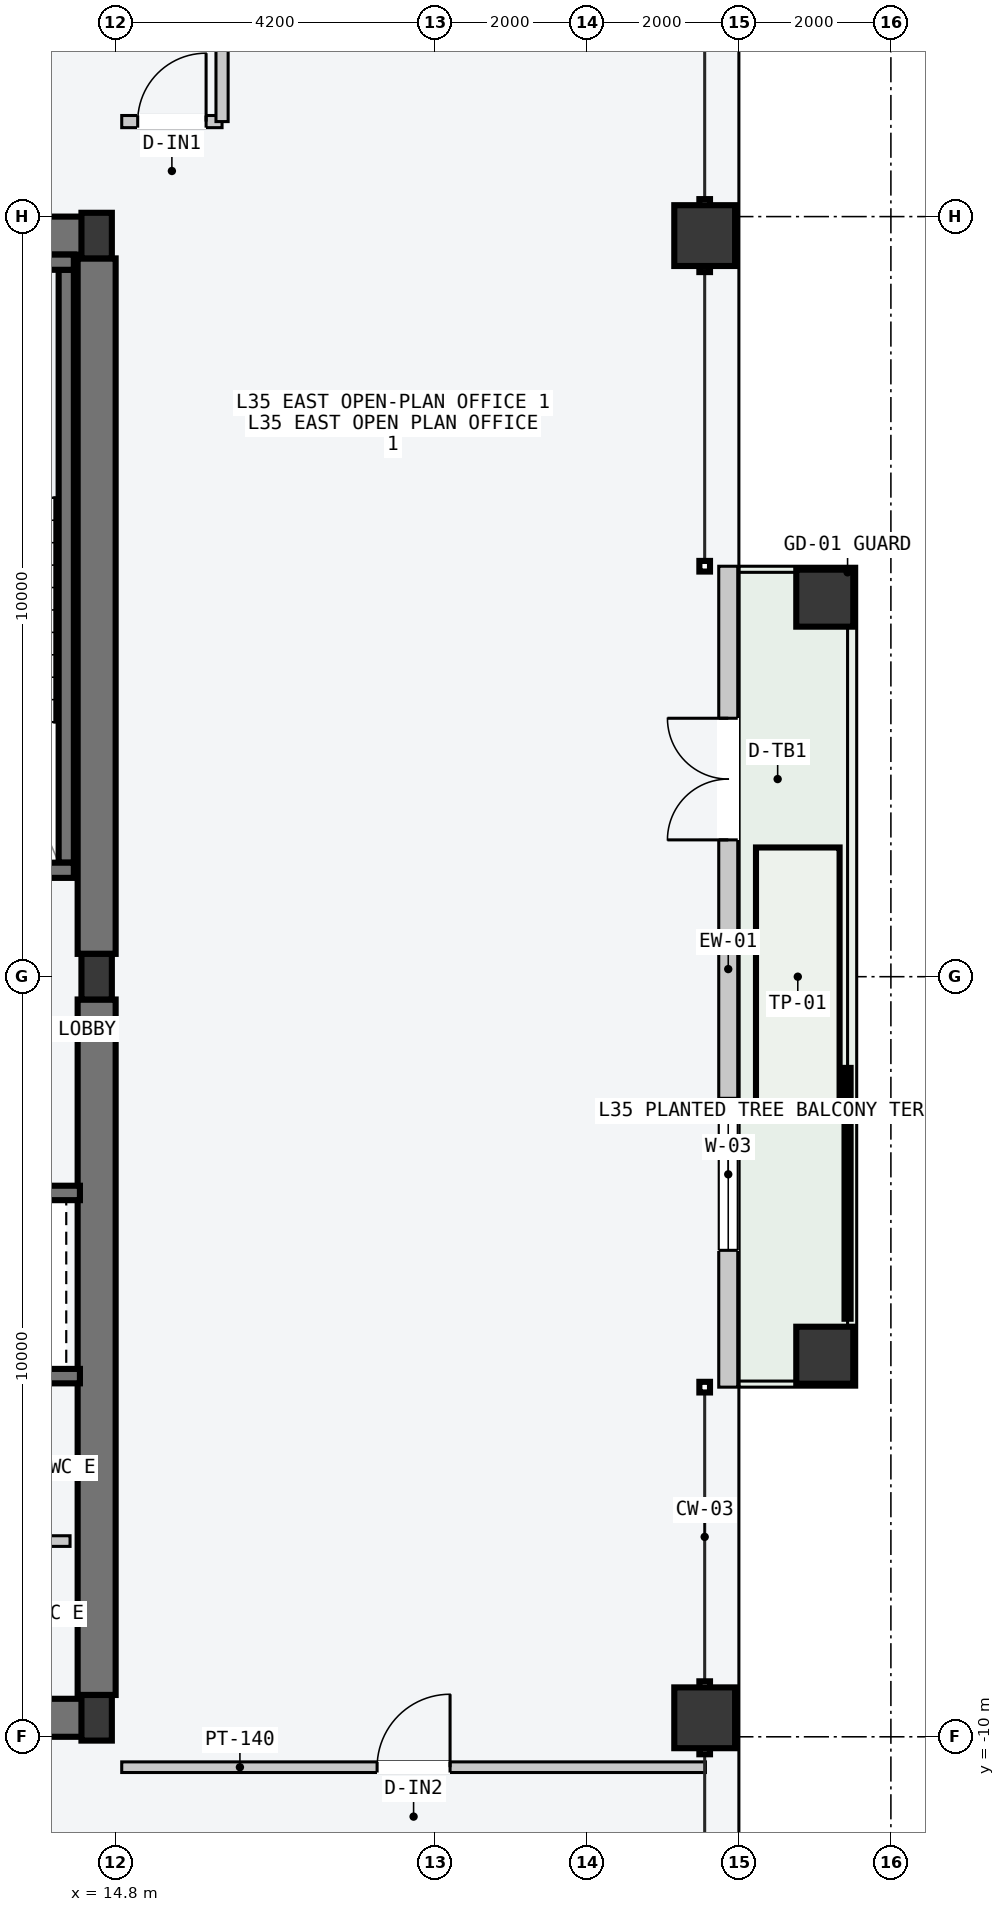
"""IFC4 building model, lengths in metres.
Left out: names, types, materials, properties, quantities, classifications, styles, units other than length and angle.
Written with IfcOpenShell. Run it as: python <this file> out.ifc"""

import sys

from ifc_helpers import new_model, si_unit, direction, frame, frame_2d, origin, origin_2d, place, context, subcontext, project, spatial, rectangle, hollow_rectangle, i_section, extrude, element, fill, save


model = new_model("IFC4")
c1 = context("Model", 3, precision=1e-05, world=origin(), true_north=direction((0.0, 1.0)))
c2 = subcontext(c1, "Body", "Model", "MODEL_VIEW")
j1 = project(units=[si_unit("LENGTHUNIT", "METRE"), si_unit("PLANEANGLEUNIT", "RADIAN")], contexts=[c1])
p1 = place(None, origin())
s1 = spatial("IfcSite", under=j1, at=p1, CompositionType="ELEMENT")
p2 = place(p1, origin())
s2 = spatial("IfcBuilding", under=s1, at=p2, CompositionType="ELEMENT")
p3 = place(p2, frame((0.0, 0.0, 135.0)))
s3 = spatial("IfcBuildingStorey", under=s2, at=p3, CompositionType="ELEMENT", Elevation=135.0)
for number, where, z_axis, x_axis in (
    (1, (8.07, -9.75, -0.2), (0.0, 0.0, 1.0), (1.0, 0.0, 0.0)),
    (2, (8.07, 9.75, -0.2), (0.0, 0.0, 1.0), (1.0, 0.0, 0.0)),
):
    element("IfcWall", number, at=place(p3, frame(where, z_axis=z_axis, x_axis=x_axis)), inside=s3, PredefinedType="SHEAR", context=c2, shape_type="SweptSolid", body=[
        extrude(rectangle(XDim=6.46, YDim=0.5, at=frame_2d((3.23, 0.0))), origin(), (0.0, 0.0, 1.0), 3.6),
    ])
for number, where, z_axis, x_axis in (
    (3, (14.55, -9.45, -0.2), (0.0, 0.0, 1.0), (0.0, 1.0, 0.0)),
    (4, (14.55, 0.3, -0.2), (0.0, 0.0, 1.0), (0.0, 1.0, 0.0)),
):
    element("IfcWall", number, at=place(p3, frame(where, z_axis=z_axis, x_axis=x_axis)), inside=s3, PredefinedType="SHEAR", context=c2, shape_type="SweptSolid", body=[
        extrude(rectangle(XDim=9.15, YDim=0.5, at=frame_2d((4.575, 0.0))), origin(), (0.0, 0.0, 1.0), 3.6),
    ])
p4 = place(p3, frame((14.15, 1.5, -0.2), z_axis=(0.0, 0.0, 1.0), x_axis=(0.0, 1.0, 0.0)))
e5 = element("IfcWall", 5, at=p4, inside=s3, PredefinedType="SOLIDWALL", context=c2, shape_type="SweptSolid", body=[
    extrude(rectangle(XDim=7.8, YDim=0.2, at=frame_2d((3.9, 0.0))), origin(), (0.0, 0.0, 1.0), 3.6),
])
p5 = place(p3, frame((10.15, 1.4, -0.2), z_axis=(0.0, 0.0, 1.0), x_axis=(1.0, 0.0, 0.0)))
e6 = element("IfcWall", 6, at=p5, inside=s3, PredefinedType="SOLIDWALL", context=c2, shape_type="SweptSolid", body=[
    extrude(rectangle(XDim=4.1, YDim=0.2, at=frame_2d((2.05, 0.0))), origin(), (0.0, 0.0, 1.0), 3.6),
])
p6 = place(p5, frame((1.5, 0.0, 0.2)))
e7 = element("IfcOpeningElement", 7, at=p6, cuts=e6, PredefinedType="OPENING", context=c2, shape_type="SweptSolid", body=[
    extrude(rectangle(XDim=1.12, YDim=2.18, at=frame_2d((0.56, 1.09))), frame((0.0, 0.11, 0.0), z_axis=(0.0, -1.0, 0.0), x_axis=(1.0, 0.0, 0.0)), (0.0, 0.0, 1.0), 0.22),
])
p7 = place(p3, frame((10.15, 9.4, -0.2), z_axis=(0.0, 0.0, 1.0), x_axis=(1.0, 0.0, 0.0)))
e8 = element("IfcWall", 8, at=p7, inside=s3, PredefinedType="SOLIDWALL", context=c2, shape_type="SweptSolid", body=[
    extrude(rectangle(XDim=4.1, YDim=0.2, at=frame_2d((2.05, 0.0))), origin(), (0.0, 0.0, 1.0), 3.6),
])
for number, where, z_axis, x_axis in (
    (9, (14.55, -9.75, 0.0), (0.0, 0.0, 1.0), (1.0, 0.0, 0.0)),
    (10, (14.55, 0.0, 0.0), (0.0, 0.0, 1.0), (1.0, 0.0, 0.0)),
    (11, (14.55, 9.75, 0.0), (0.0, 0.0, 1.0), (1.0, 0.0, 0.0)),
):
    element("IfcColumn", number, at=place(p3, frame(where, z_axis=z_axis, x_axis=x_axis)), inside=s3, PredefinedType="COLUMN", context=c2, shape_type="SweptSolid", body=[
        extrude(i_section(OverallWidth=0.4, OverallDepth=0.6, WebThickness=0.022, FlangeThickness=0.036, at=origin_2d()), origin(), (0.0, 0.0, 1.0), 3.6),
    ])
for number, where, z_axis, x_axis in (
    (12, (22.55, -9.75, 0.0), (0.0, 0.0, 1.0), (0.0, 1.0, 0.0)),
    (13, (22.55, 9.75, 0.0), (0.0, 0.0, 1.0), (0.0, 1.0, 0.0)),
):
    element("IfcColumn", number, at=place(p3, frame(where, z_axis=z_axis, x_axis=x_axis)), inside=s3, PredefinedType="COLUMN", context=c2, shape_type="SweptSolid", body=[
        extrude(hollow_rectangle(XDim=0.8, YDim=0.8, WallThickness=0.036, at=origin_2d()), origin(), (0.0, 0.0, 1.0), 3.6),
    ])
for number, where, z_axis, x_axis in (
    (14, (24.13, -4.98, 0.0), (0.0, 0.0, 1.0), (0.0, 1.0, 0.0)),
    (15, (24.13, 4.98, 0.0), (0.0, 0.0, 1.0), (0.0, 1.0, 0.0)),
):
    element("IfcColumn", number, at=place(p3, frame(where, z_axis=z_axis, x_axis=x_axis)), inside=s3, PredefinedType="COLUMN", context=c2, shape_type="SweptSolid", body=[
        extrude(hollow_rectangle(XDim=0.75, YDim=0.75, WallThickness=0.032, at=origin_2d()), origin(), (0.0, 0.0, 1.0), 3.6),
    ])
p8 = place(p3, frame((22.86, -5.4, 0.0), z_axis=(0.0, 0.0, 1.0), x_axis=(0.0, 1.0, 0.0)))
e16 = element("IfcWall", 16, at=p8, inside=s3, PredefinedType="STANDARD", context=c2, shape_type="SweptSolid", body=[
    extrude(rectangle(XDim=10.8, YDim=0.25, at=frame_2d((5.4, 0.0))), origin(), (0.0, 0.0, 1.0), 3.4),
])
p9 = place(p8, frame((7.2, 0.0, 0.0)))
e17 = element("IfcOpeningElement", 17, at=p9, cuts=e16, PredefinedType="OPENING", context=c2, shape_type="SweptSolid", body=[
    extrude(rectangle(XDim=1.6, YDim=2.2, at=frame_2d((0.8, 1.1))), frame((0.0, 0.135, 0.0), z_axis=(0.0, -1.0, 0.0), x_axis=(1.0, 0.0, 0.0)), (0.0, 0.0, 1.0), 0.27),
])
p10 = place(p8, frame((1.8, 0.0, 0.85)))
e18 = element("IfcOpeningElement", 18, at=p10, cuts=e16, PredefinedType="OPENING", context=c2, shape_type="SweptSolid", body=[
    extrude(rectangle(XDim=2.0, YDim=2.1, at=frame_2d((1.0, 1.05))), frame((0.0, 0.135, 0.0), z_axis=(0.0, -1.0, 0.0), x_axis=(1.0, 0.0, 0.0)), (0.0, 0.0, 1.0), 0.27),
])
p11 = place(p3, frame((11.65, -2.845, -0.2), z_axis=(0.0, 0.0, 1.0), x_axis=(1.0, 0.0, 0.0)))
e19 = element("IfcWall", 19, at=p11, inside=s3, PredefinedType="SOLIDWALL", context=c2, shape_type="SweptSolid", body=[
    extrude(rectangle(XDim=2.68, YDim=0.19, at=frame_2d((1.34, 0.0))), origin(), (0.0, 0.0, 1.0), 3.6),
])
p12 = place(p11, frame((0.65, 0.0, 0.2)))
e20 = element("IfcOpeningElement", 20, at=p12, cuts=e19, PredefinedType="OPENING", context=c2, shape_type="SweptSolid", body=[
    extrude(rectangle(XDim=1.2, YDim=2.2, at=frame_2d((0.6, 1.1))), frame((0.0, 0.105, 0.0), z_axis=(0.0, -1.0, 0.0), x_axis=(1.0, 0.0, 0.0)), (0.0, 0.0, 1.0), 0.21),
])
p13 = place(p3, frame((11.65, -5.255, -0.2), z_axis=(0.0, 0.0, 1.0), x_axis=(1.0, 0.0, 0.0)))
e21 = element("IfcWall", 21, at=p13, inside=s3, PredefinedType="SOLIDWALL", context=c2, shape_type="SweptSolid", body=[
    extrude(rectangle(XDim=2.68, YDim=0.19, at=frame_2d((1.34, 0.0))), origin(), (0.0, 0.0, 1.0), 3.6),
])
p14 = place(p3, frame((11.7, -7.425, 0.0), z_axis=(0.0, 0.0, 1.0), x_axis=(1.0, 0.0, 0.0)))
e22 = element("IfcWall", 22, at=p14, inside=s3, PredefinedType="PARTITIONING", context=c2, shape_type="SweptSolid", body=[
    extrude(rectangle(XDim=2.5, YDim=0.14, at=frame_2d((1.25, 0.0))), origin(), (0.0, 0.0, 1.0), 3.4),
])
p15 = place(p3, frame((14.88, -10.4, 0.0), z_axis=(0.0, 0.0, 1.0), x_axis=(1.0, 0.0, 0.0)))
e23 = element("IfcWall", 23, at=p15, inside=s3, PredefinedType="PARTITIONING", context=c2, shape_type="SweptSolid", body=[
    extrude(rectangle(XDim=7.68, YDim=0.14, at=frame_2d((3.84, 0.0))), origin(), (0.0, 0.0, 1.0), 3.4),
])
p16 = place(p15, frame((3.36, 0.0, 0.0)))
e24 = element("IfcOpeningElement", 24, at=p16, cuts=e23, PredefinedType="OPENING", context=c2, shape_type="SweptSolid", body=[
    extrude(rectangle(XDim=0.96, YDim=2.18, at=frame_2d((0.48, 1.09))), frame((0.0, 0.08, 0.0), z_axis=(0.0, -1.0, 0.0), x_axis=(1.0, 0.0, 0.0)), (0.0, 0.0, 1.0), 0.16),
])
p17 = place(p3, frame((14.88, 11.25, 0.0), z_axis=(0.0, 0.0, 1.0), x_axis=(1.0, 0.0, 0.0)))
e25 = element("IfcWall", 25, at=p17, inside=s3, PredefinedType="PARTITIONING", context=c2, shape_type="SweptSolid", body=[
    extrude(rectangle(XDim=1.32, YDim=0.16, at=frame_2d((0.66, 0.0))), origin(), (0.0, 0.0, 1.0), 3.4),
])
p18 = place(p17, frame((0.21, 0.0, 0.0)))
e26 = element("IfcOpeningElement", 26, at=p18, cuts=e25, PredefinedType="OPENING", context=c2, shape_type="SweptSolid", body=[
    extrude(rectangle(XDim=0.9, YDim=2.15, at=frame_2d((0.45, 1.075))), frame((0.0, 0.09, 0.0), z_axis=(0.0, -1.0, 0.0), x_axis=(1.0, 0.0, 0.0)), (0.0, 0.0, 1.0), 0.18),
])
p19 = place(p3, frame((16.2, 11.25, 0.0), z_axis=(0.0, 0.0, 1.0), x_axis=(0.0, 1.0, 0.0)))
e27 = element("IfcWall", 27, at=p19, inside=s3, PredefinedType="PARTITIONING", context=c2, shape_type="SweptSolid", body=[
    extrude(rectangle(XDim=1.95, YDim=0.16, at=frame_2d((0.975, 0.0))), origin(), (0.0, 0.0, 1.0), 3.4),
])
p20 = place(p9, origin())
e28 = element("IfcDoor", 28, at=p20, inside=s3, OperationType="DOUBLE_DOOR_SINGLE_SWING", PredefinedType="DOOR", context=c2, shape_type="SweptSolid", body=[
    extrude(rectangle(XDim=1.6, YDim=2.2, at=frame_2d((0.8, 1.1))), frame((0.0, 0.025, 0.0), z_axis=(0.0, -1.0, 0.0), x_axis=(1.0, 0.0, 0.0)), (0.0, 0.0, 1.0), 0.05),
])
fill(e17, e28)
p21 = place(p10, origin())
e29 = element("IfcWindow", 29, at=p21, inside=s3, PartitioningType="SINGLE_PANEL", PredefinedType="WINDOW", context=c2, shape_type="SweptSolid", body=[
    extrude(rectangle(XDim=2.0, YDim=2.1, at=frame_2d((1.0, 1.05))), frame((0.0, 0.03, 0.0), z_axis=(0.0, -1.0, 0.0), x_axis=(1.0, 0.0, 0.0)), (0.0, 0.0, 1.0), 0.06),
])
fill(e18, e29)
p22 = place(p16, origin())
e30 = element("IfcDoor", 30, at=p22, inside=s3, OperationType="SINGLE_SWING_RIGHT", PredefinedType="DOOR", context=c2, shape_type="SweptSolid", body=[
    extrude(rectangle(XDim=0.96, YDim=2.18, at=frame_2d((0.48, 1.09))), frame((0.0, 0.025, 0.0), z_axis=(0.0, -1.0, 0.0), x_axis=(1.0, 0.0, 0.0)), (0.0, 0.0, 1.0), 0.05),
])
fill(e24, e30)
p23 = place(p18, origin())
e31 = element("IfcDoor", 31, at=p23, inside=s3, OperationType="SINGLE_SWING_RIGHT", PredefinedType="DOOR", context=c2, shape_type="SweptSolid", body=[
    extrude(rectangle(XDim=0.9, YDim=2.15, at=frame_2d((0.45, 1.075))), frame((0.0, 0.025, 0.0), z_axis=(0.0, -1.0, 0.0), x_axis=(1.0, 0.0, 0.0)), (0.0, 0.0, 1.0), 0.05),
])
fill(e26, e31)
save(model, sys.argv[1])
